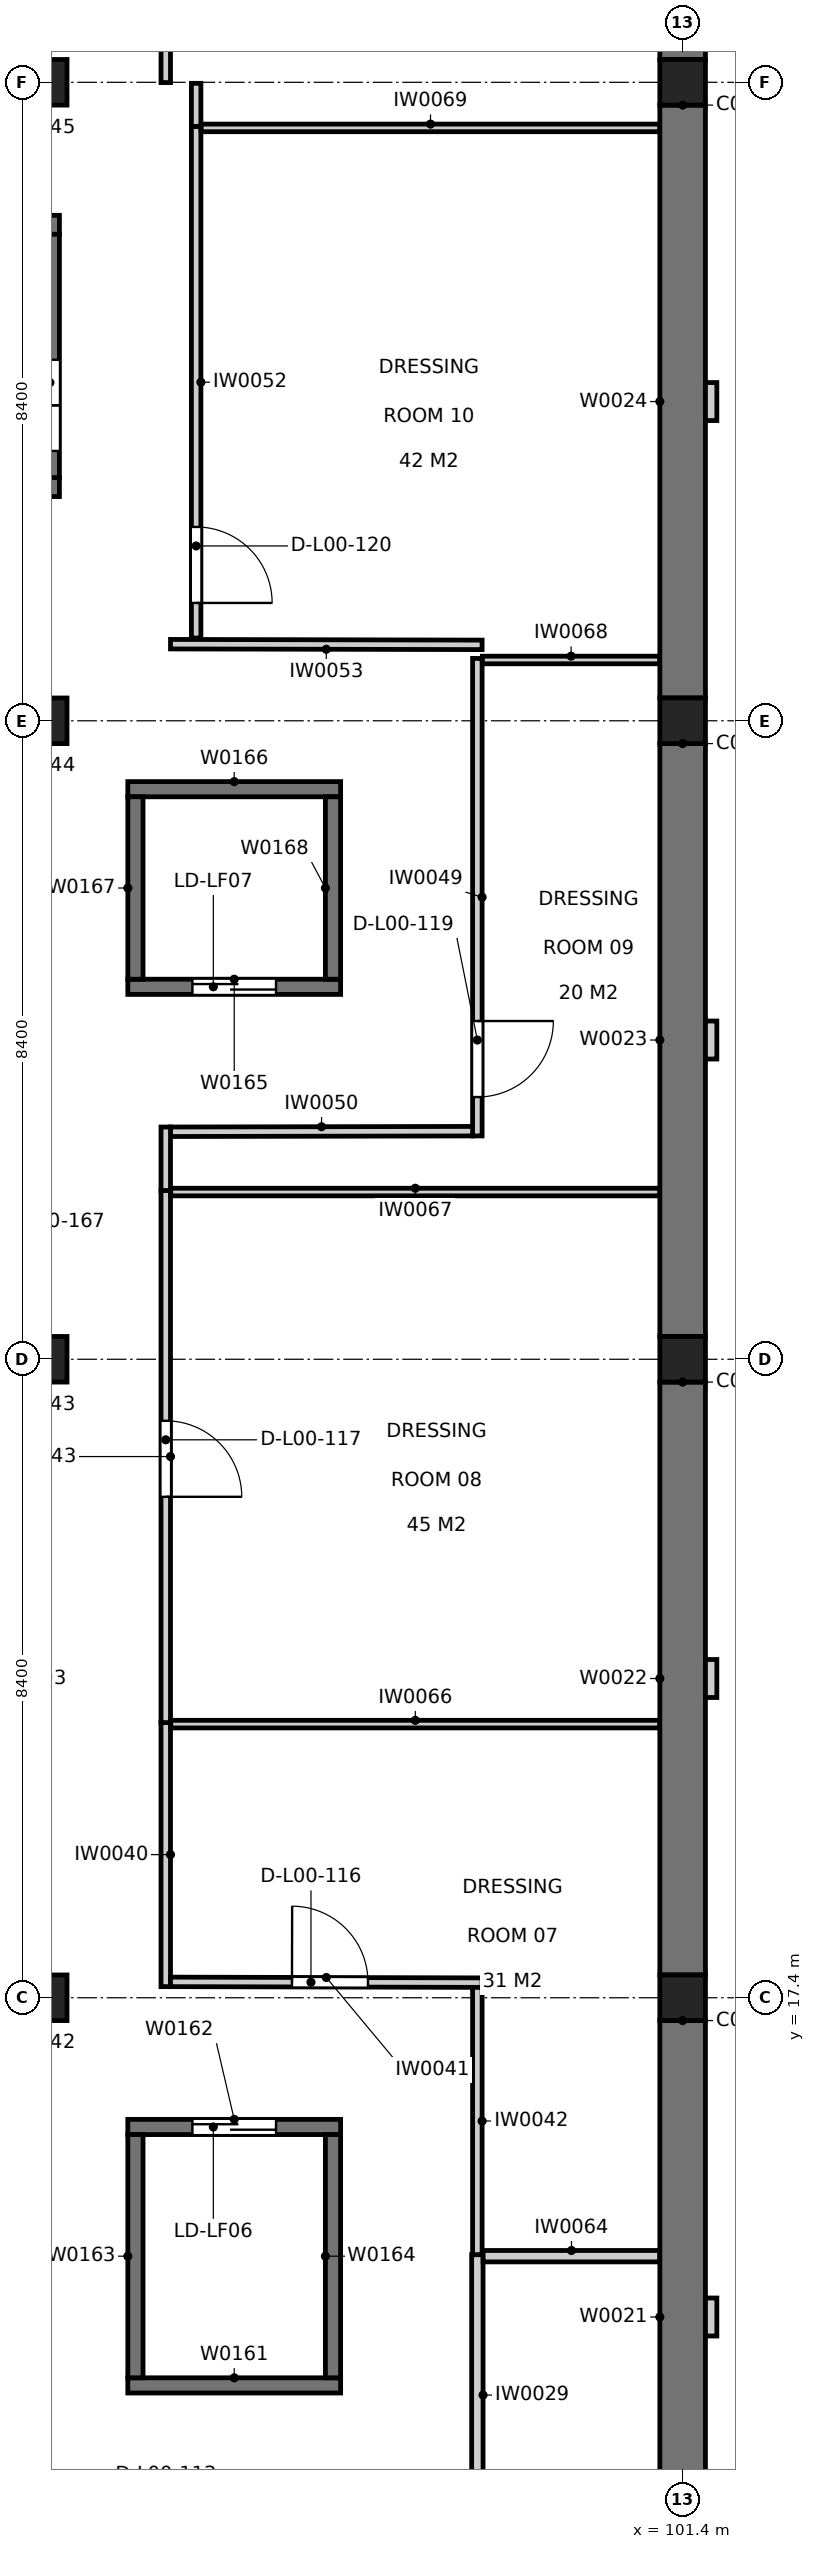
"""IFC4 building model, lengths in metres.
Left out: names, types, materials, properties, quantities, classifications, styles, units other than length and angle.
Written with IfcOpenShell. Run it as: python <this file> out.ifc"""

import sys

from ifc_helpers import new_model, si_unit, direction, frame, frame_2d, origin, origin_2d, place, context, subcontext, project, spatial, rectangle, extrude, element, fill, save


model = new_model("IFC4")
c1 = context("Model", 3, precision=1e-05, world=origin(), true_north=direction((0.0, 1.0)))
c2 = subcontext(c1, "Body", "Model", "MODEL_VIEW")
j1 = project(units=[si_unit("LENGTHUNIT", "METRE"), si_unit("PLANEANGLEUNIT", "RADIAN")], contexts=[c1])
p1 = place(None, origin())
s1 = spatial("IfcSite", under=j1, at=p1, CompositionType="ELEMENT")
p2 = place(p1, origin())
s2 = spatial("IfcBuilding", under=s1, at=p2, CompositionType="ELEMENT")
p3 = place(p2, origin())
s3 = spatial("IfcBuildingStorey", under=s2, at=p3, CompositionType="ELEMENT", Elevation=0.0)
for number, where, z_axis, x_axis in (
    (1, (93.0, 17.4, 0.0), (0.0, 0.0, 1.0), (1.0, 0.0, 0.0)),
    (2, (93.0, 25.8, 0.0), (0.0, 0.0, 1.0), (1.0, 0.0, 0.0)),
    (3, (93.0, 34.2, 0.0), (0.0, 0.0, 1.0), (1.0, 0.0, 0.0)),
    (4, (93.0, 42.6, 0.0), (0.0, 0.0, 1.0), (1.0, 0.0, 0.0)),
    (5, (101.4, 17.4, 0.0), (0.0, 0.0, 1.0), (1.0, 0.0, 0.0)),
    (6, (101.4, 25.8, 0.0), (0.0, 0.0, 1.0), (1.0, 0.0, 0.0)),
    (7, (101.4, 34.2, 0.0), (0.0, 0.0, 1.0), (1.0, 0.0, 0.0)),
    (8, (101.4, 42.6, 0.0), (0.0, 0.0, 1.0), (1.0, 0.0, 0.0)),
):
    element("IfcColumn", number, at=place(p3, frame(where, z_axis=z_axis, x_axis=x_axis)), inside=s3, PredefinedType="COLUMN", context=c2, shape_type="SweptSolid", body=[
        extrude(rectangle(XDim=0.6, YDim=0.6, at=origin_2d()), origin(), (0.0, 0.0, 1.0), 4.8),
    ])
for number, where, z_axis, x_axis in (
    (9, (101.4, 9.3, 0.0), (0.0, 0.0, 1.0), (0.0, 1.0, 0.0)),
    (10, (101.4, 17.7, 0.0), (0.0, 0.0, 1.0), (0.0, 1.0, 0.0)),
):
    element("IfcWall", number, at=place(p3, frame(where, z_axis=z_axis, x_axis=x_axis)), inside=s3, PredefinedType="SOLIDWALL", context=c2, shape_type="SweptSolid", body=[
        extrude(rectangle(XDim=7.8, YDim=0.6, at=frame_2d((3.9, 0.0))), origin(), (0.0, 0.0, 1.0), 4.8),
    ])
p4 = place(p3, frame((101.4, 26.1, 0.0), z_axis=(0.0, 0.0, 1.0), x_axis=(0.0, 1.0, 0.0)))
e11 = element("IfcWall", 11, at=p4, inside=s3, PredefinedType="SOLIDWALL", context=c2, shape_type="SweptSolid", body=[
    extrude(rectangle(XDim=7.8, YDim=0.6, at=frame_2d((3.9, 0.0))), origin(), (0.0, 0.0, 1.0), 4.8),
])
for number, where, z_axis, x_axis in (
    (12, (101.4, 34.5, 0.0), (0.0, 0.0, 1.0), (0.0, 1.0, 0.0)),
    (13, (101.4, 42.9, 0.0), (0.0, 0.0, 1.0), (0.0, 1.0, 0.0)),
):
    element("IfcWall", number, at=place(p3, frame(where, z_axis=z_axis, x_axis=x_axis)), inside=s3, PredefinedType="SOLIDWALL", context=c2, shape_type="SweptSolid", body=[
        extrude(rectangle(XDim=7.8, YDim=0.6, at=frame_2d((3.9, 0.0))), origin(), (0.0, 0.0, 1.0), 4.8),
    ])
for number, where, z_axis, x_axis in (
    (14, (85.8, 37.275, 0.0), (0.0, 0.0, 1.0), (1.0, 0.0, 0.0)),
    (15, (85.8, 40.725, 0.0), (0.0, 0.0, 1.0), (1.0, 0.0, 0.0)),
):
    element("IfcWall", number, at=place(p3, frame(where, z_axis=z_axis, x_axis=x_axis)), inside=s3, PredefinedType="SOLIDWALL", context=c2, shape_type="SweptSolid", body=[
        extrude(rectangle(XDim=7.4, YDim=0.25, at=frame_2d((3.7, 0.0))), origin(), (0.0, 0.0, 1.0), 4.8),
    ])
p5 = place(p3, frame((93.075, 37.4, 0.0), z_axis=(0.0, 0.0, 1.0), x_axis=(0.0, 1.0, 0.0)))
e16 = element("IfcWall", 16, at=p5, inside=s3, PredefinedType="SOLIDWALL", context=c2, shape_type="SweptSolid", body=[
    extrude(rectangle(XDim=3.2, YDim=0.25, at=frame_2d((1.6, 0.0))), origin(), (0.0, 0.0, 1.0), 4.8),
])
p6 = place(p5, frame((0.35, 0.0, 0.0)))
e17 = element("IfcOpeningElement", 17, at=p6, cuts=e16, PredefinedType="OPENING", context=c2, shape_type="SweptSolid", body=[
    extrude(rectangle(XDim=1.2, YDim=2.1, at=frame_2d((0.6, 1.05))), frame((0.0, 0.135, 0.0), z_axis=(0.0, -1.0, 0.0), x_axis=(1.0, 0.0, 0.0)), (0.0, 0.0, 1.0), 0.27),
])
p7 = place(p3, frame((94.1, 12.3, 0.0), z_axis=(0.0, 0.0, 1.0), x_axis=(1.0, 0.0, 0.0)))
e18 = element("IfcWall", 18, at=p7, inside=s3, PredefinedType="SOLIDWALL", context=c2, shape_type="SweptSolid", body=[
    extrude(rectangle(XDim=2.8, YDim=0.2, at=frame_2d((1.4, 0.0))), origin(), (0.0, 0.0, 1.0), 4.8),
])
p8 = place(p3, frame((94.1, 15.7, 0.0), z_axis=(0.0, 0.0, 1.0), x_axis=(1.0, 0.0, 0.0)))
e19 = element("IfcWall", 19, at=p8, inside=s3, PredefinedType="SOLIDWALL", context=c2, shape_type="SweptSolid", body=[
    extrude(rectangle(XDim=2.8, YDim=0.2, at=frame_2d((1.4, 0.0))), origin(), (0.0, 0.0, 1.0), 4.8),
])
p9 = place(p8, frame((0.85, 0.0, 0.0)))
e20 = element("IfcOpeningElement", 20, at=p9, cuts=e19, PredefinedType="OPENING", context=c2, shape_type="SweptSolid", body=[
    extrude(rectangle(XDim=1.1, YDim=2.1, at=frame_2d((0.55, 1.05))), frame((0.0, 0.11, 0.0), z_axis=(0.0, -1.0, 0.0), x_axis=(1.0, 0.0, 0.0)), (0.0, 0.0, 1.0), 0.22),
])
for number, where, z_axis, x_axis in (
    (21, (94.2, 12.4, 0.0), (0.0, 0.0, 1.0), (0.0, 1.0, 0.0)),
    (22, (96.8, 12.4, 0.0), (0.0, 0.0, 1.0), (0.0, 1.0, 0.0)),
):
    element("IfcWall", number, at=place(p3, frame(where, z_axis=z_axis, x_axis=x_axis)), inside=s3, PredefinedType="SOLIDWALL", context=c2, shape_type="SweptSolid", body=[
        extrude(rectangle(XDim=3.2, YDim=0.2, at=frame_2d((1.6, 0.0))), origin(), (0.0, 0.0, 1.0), 4.8),
    ])
p10 = place(p3, frame((94.1, 30.7, 0.0), z_axis=(0.0, 0.0, 1.0), x_axis=(1.0, 0.0, 0.0)))
e23 = element("IfcWall", 23, at=p10, inside=s3, PredefinedType="SOLIDWALL", context=c2, shape_type="SweptSolid", body=[
    extrude(rectangle(XDim=2.8, YDim=0.2, at=frame_2d((1.4, 0.0))), origin(), (0.0, 0.0, 1.0), 4.8),
])
p11 = place(p10, frame((0.85, 0.0, 0.0)))
e24 = element("IfcOpeningElement", 24, at=p11, cuts=e23, PredefinedType="OPENING", context=c2, shape_type="SweptSolid", body=[
    extrude(rectangle(XDim=1.1, YDim=2.1, at=frame_2d((0.55, 1.05))), frame((0.0, 0.11, 0.0), z_axis=(0.0, -1.0, 0.0), x_axis=(1.0, 0.0, 0.0)), (0.0, 0.0, 1.0), 0.22),
])
p12 = place(p3, frame((94.1, 33.3, 0.0), z_axis=(0.0, 0.0, 1.0), x_axis=(1.0, 0.0, 0.0)))
e25 = element("IfcWall", 25, at=p12, inside=s3, PredefinedType="SOLIDWALL", context=c2, shape_type="SweptSolid", body=[
    extrude(rectangle(XDim=2.8, YDim=0.2, at=frame_2d((1.4, 0.0))), origin(), (0.0, 0.0, 1.0), 4.8),
])
for number, where, z_axis, x_axis in (
    (26, (94.2, 30.8, 0.0), (0.0, 0.0, 1.0), (0.0, 1.0, 0.0)),
    (27, (96.8, 30.8, 0.0), (0.0, 0.0, 1.0), (0.0, 1.0, 0.0)),
):
    element("IfcWall", number, at=place(p3, frame(where, z_axis=z_axis, x_axis=x_axis)), inside=s3, PredefinedType="SOLIDWALL", context=c2, shape_type="SweptSolid", body=[
        extrude(rectangle(XDim=2.4, YDim=0.2, at=frame_2d((1.2, 0.0))), origin(), (0.0, 0.0, 1.0), 4.8),
    ])
p13 = place(p3, frame((98.699, 14.02, 0.0), z_axis=(0.0, 0.0, 1.0), x_axis=(0.0, -1.0, 0.0)))
e28 = element("IfcWall", 28, at=p13, inside=s3, PredefinedType="PARTITIONING", context=c2, shape_type="SweptSolid", body=[
    extrude(rectangle(XDim=3.694, YDim=0.15, at=frame_2d((1.847, 0.0))), origin(), (0.0, 0.0, 1.0), 3.94),
])
p14 = place(p3, frame((94.599, 21.02, 0.0), z_axis=(0.0, 0.0, 1.0), x_axis=(0.0, -1.0, 0.0)))
e29 = element("IfcWall", 29, at=p14, inside=s3, PredefinedType="PARTITIONING", context=c2, shape_type="SweptSolid", body=[
    extrude(rectangle(XDim=3.474, YDim=0.125, at=frame_2d((1.737, 0.0))), origin(), (0.0, 0.0, 1.0), 3.84),
])
p15 = place(p3, frame((94.662, 17.609, 0.0), z_axis=(0.0, 0.0, 1.0), x_axis=(0.999997019568, -0.002441486203, 0.0)))
e30 = element("IfcWall", 30, at=p15, inside=s3, PredefinedType="PARTITIONING", context=c2, shape_type="SweptSolid", body=[
    extrude(rectangle(XDim=4.1, YDim=0.125, at=frame_2d((2.05, 0.0))), origin(), (0.0, 0.0, 1.0), 3.84),
])
p16 = place(p15, frame((1.598, 0.0, 0.0)))
e31 = element("IfcOpeningElement", 31, at=p16, cuts=e30, PredefinedType="OPENING", context=c2, shape_type="SweptSolid", body=[
    extrude(rectangle(XDim=1.0, YDim=2.1, at=frame_2d((0.5, 1.05))), frame((0.0, 0.073, 0.0), z_axis=(0.0, -1.0, 0.0), x_axis=(1.0, 0.0, 0.0)), (0.0, 0.0, 1.0), 0.145),
])
p17 = place(p3, frame((98.699, 17.537, 0.0), z_axis=(0.0, 0.0, 1.0), x_axis=(0.0, -1.0, 0.0)))
e32 = element("IfcWall", 32, at=p17, inside=s3, PredefinedType="PARTITIONING", context=c2, shape_type="SweptSolid", body=[
    extrude(rectangle(XDim=3.517, YDim=0.125, at=frame_2d((1.758, 0.0))), origin(), (0.0, 0.0, 1.0), 3.84),
])
p18 = place(p3, frame((94.599, 28.02, 0.0), z_axis=(0.0, 0.0, 1.0), x_axis=(0.0, -1.0, 0.0)))
e33 = element("IfcWall", 33, at=p18, inside=s3, PredefinedType="PARTITIONING", context=c2, shape_type="SweptSolid", body=[
    extrude(rectangle(XDim=7.0, YDim=0.125, at=frame_2d((3.5, 0.0))), origin(), (0.0, 0.0, 1.0), 3.84),
])
p19 = place(p18, frame((3.03, 0.0, 0.0)))
e34 = element("IfcOpeningElement", 34, at=p19, cuts=e33, PredefinedType="OPENING", context=c2, shape_type="SweptSolid", body=[
    extrude(rectangle(XDim=1.0, YDim=2.1, at=frame_2d((0.5, 1.05))), frame((0.0, 0.073, 0.0), z_axis=(0.0, -1.0, 0.0), x_axis=(1.0, 0.0, 0.0)), (0.0, 0.0, 1.0), 0.145),
])
p20 = place(p3, frame((98.699, 35.02, 0.0), z_axis=(0.0, 0.0, 1.0), x_axis=(0.0, -1.0, 0.0)))
e35 = element("IfcWall", 35, at=p20, inside=s3, PredefinedType="PARTITIONING", context=c2, shape_type="SweptSolid", body=[
    extrude(rectangle(XDim=6.281, YDim=0.125, at=frame_2d((3.141, 0.0))), origin(), (0.0, 0.0, 1.0), 3.84),
])
p21 = place(p20, frame((4.77, 0.0, 0.0)))
e36 = element("IfcOpeningElement", 36, at=p21, cuts=e35, PredefinedType="OPENING", context=c2, shape_type="SweptSolid", body=[
    extrude(rectangle(XDim=1.0, YDim=2.1, at=frame_2d((0.5, 1.05))), frame((0.0, 0.073, 0.0), z_axis=(0.0, -1.0, 0.0), x_axis=(1.0, 0.0, 0.0)), (0.0, 0.0, 1.0), 0.145),
])
p22 = place(p3, frame((98.636, 28.801, 0.0), z_axis=(0.0, 0.0, 1.0), x_axis=(-0.999998187283, -0.001904056496, 0.0)))
e37 = element("IfcWall", 37, at=p22, inside=s3, PredefinedType="PARTITIONING", context=c2, shape_type="SweptSolid", body=[
    extrude(rectangle(XDim=3.975, YDim=0.125, at=frame_2d((1.987, 0.0))), origin(), (0.0, 0.0, 1.0), 3.94),
])
p23 = place(p3, frame((94.599, 28.855, 0.0), z_axis=(0.0, 0.0, 1.0), x_axis=(0.0, -1.0, 0.0)))
e38 = element("IfcWall", 38, at=p23, inside=s3, PredefinedType="PARTITIONING", context=c2, shape_type="SweptSolid", body=[
    extrude(rectangle(XDim=0.835, YDim=0.125, at=frame_2d((0.418, 0.0))), origin(), (0.0, 0.0, 1.0), 3.94),
])
p24 = place(p3, frame((94.999, 42.02, 0.0), z_axis=(0.0, 0.0, 1.0), x_axis=(0.0, -1.0, 0.0)))
e39 = element("IfcWall", 39, at=p24, inside=s3, PredefinedType="PARTITIONING", context=c2, shape_type="SweptSolid", body=[
    extrude(rectangle(XDim=6.731, YDim=0.125, at=frame_2d((3.366, 0.0))), origin(), (0.0, 0.0, 1.0), 3.94),
])
p25 = place(p24, frame((5.27, 0.0, 0.0)))
e40 = element("IfcOpeningElement", 40, at=p25, cuts=e39, PredefinedType="OPENING", context=c2, shape_type="SweptSolid", body=[
    extrude(rectangle(XDim=1.0, YDim=2.1, at=frame_2d((0.5, 1.05))), frame((0.0, 0.073, 0.0), z_axis=(0.0, -1.0, 0.0), x_axis=(1.0, 0.0, 0.0)), (0.0, 0.0, 1.0), 0.145),
])
p26 = place(p3, frame((94.662, 35.208, 0.0), z_axis=(0.0, 0.0, 1.0), x_axis=(0.999997702175, -0.002143745446, 0.0)))
e41 = element("IfcWall", 41, at=p26, inside=s3, PredefinedType="PARTITIONING", context=c2, shape_type="SweptSolid", body=[
    extrude(rectangle(XDim=4.1, YDim=0.125, at=frame_2d((2.05, 0.0))), origin(), (0.0, 0.0, 1.0), 4.64),
])
p27 = place(p3, frame((94.599, 49.02, 0.0), z_axis=(0.0, 0.0, 1.0), x_axis=(0.0, -1.0, 0.0)))
e42 = element("IfcWall", 42, at=p27, inside=s3, PredefinedType="PARTITIONING", context=c2, shape_type="SweptSolid", body=[
    extrude(rectangle(XDim=6.424, YDim=0.125, at=frame_2d((3.212, 0.0))), origin(), (0.0, 0.0, 1.0), 3.84),
])
p28 = place(p27, frame((3.229, 0.0, 0.0)))
e43 = element("IfcOpeningElement", 43, at=p28, cuts=e42, PredefinedType="OPENING", context=c2, shape_type="SweptSolid", body=[
    extrude(rectangle(XDim=1.0, YDim=2.1, at=frame_2d((0.5, 1.05))), frame((0.0, 0.073, 0.0), z_axis=(0.0, -1.0, 0.0), x_axis=(1.0, 0.0, 0.0)), (0.0, 0.0, 1.0), 0.145),
])
p29 = place(p3, frame((94.999, 42.586, 0.0), z_axis=(0.0, 0.0, 1.0), x_axis=(0.0, -1.0, 0.0)))
e44 = element("IfcWall", 44, at=p29, inside=s3, PredefinedType="PARTITIONING", context=c2, shape_type="SweptSolid", body=[
    extrude(rectangle(XDim=0.566, YDim=0.125, at=frame_2d((0.283, 0.0))), origin(), (0.0, 0.0, 1.0), 3.84),
])
p30 = place(p3, frame((98.775, 14.0, 0.0), z_axis=(0.0, 0.0, 1.0), x_axis=(1.0, 0.0, 0.0)))
e45 = element("IfcWall", 45, at=p30, inside=s3, PredefinedType="PARTITIONING", context=c2, shape_type="SweptSolid", body=[
    extrude(rectangle(XDim=2.325, YDim=0.15, at=frame_2d((1.163, 0.0))), origin(), (0.0, 0.0, 1.0), 4.64),
])
for number, where, z_axis, x_axis in (
    (46, (94.665, 21.0, 0.0), (0.0, 0.0, 1.0), (1.0, 0.0, 0.0)),
    (47, (94.665, 28.0, 0.0), (0.0, 0.0, 1.0), (1.0, 0.0, 0.0)),
):
    element("IfcWall", number, at=place(p3, frame(where, z_axis=z_axis, x_axis=x_axis)), inside=s3, PredefinedType="PARTITIONING", context=c2, shape_type="SweptSolid", body=[
        extrude(rectangle(XDim=6.435, YDim=0.1, at=frame_2d((3.218, 0.0))), origin(), (0.0, 0.0, 1.0), 4.64),
    ])
p31 = place(p3, frame((98.765, 35.0, 0.0), z_axis=(0.0, 0.0, 1.0), x_axis=(1.0, 0.0, 0.0)))
e48 = element("IfcWall", 48, at=p31, inside=s3, PredefinedType="PARTITIONING", context=c2, shape_type="SweptSolid", body=[
    extrude(rectangle(XDim=2.335, YDim=0.1, at=frame_2d((1.167, 0.0))), origin(), (0.0, 0.0, 1.0), 4.64),
])
p32 = place(p3, frame((95.065, 42.0, 0.0), z_axis=(0.0, 0.0, 1.0), x_axis=(1.0, 0.0, 0.0)))
e49 = element("IfcWall", 49, at=p32, inside=s3, PredefinedType="PARTITIONING", context=c2, shape_type="SweptSolid", body=[
    extrude(rectangle(XDim=6.035, YDim=0.1, at=frame_2d((3.018, 0.0))), origin(), (0.0, 0.0, 1.0), 4.64),
])
for number, where, z_axis, x_axis in (
    (50, (101.775, 12.95, 0.0), (0.0, 0.0, 1.0), (0.0, 1.0, 0.0)),
    (51, (101.775, 21.35, 0.0), (0.0, 0.0, 1.0), (0.0, 1.0, 0.0)),
    (52, (101.775, 29.75, 0.0), (0.0, 0.0, 1.0), (0.0, 1.0, 0.0)),
    (53, (101.775, 38.15, 0.0), (0.0, 0.0, 1.0), (0.0, 1.0, 0.0)),
):
    element("IfcWall", number, at=place(p3, frame(where, z_axis=z_axis, x_axis=x_axis)), inside=s3, PredefinedType="SOLIDWALL", context=c2, shape_type="SweptSolid", body=[
        extrude(rectangle(XDim=0.5, YDim=0.15, at=frame_2d((0.25, 0.0))), origin(), (0.0, 0.0, 1.0), 4.8),
    ])
p33 = place(p16, origin())
e54 = element("IfcDoor", 54, at=p33, inside=s3, OperationType="SINGLE_SWING_LEFT", PredefinedType="DOOR", context=c2, shape_type="SweptSolid", body=[
    extrude(rectangle(XDim=1.0, YDim=2.1, at=frame_2d((0.5, 1.05))), frame((0.0, 0.025, 0.0), z_axis=(0.0, -1.0, 0.0), x_axis=(1.0, 0.0, 0.0)), (0.0, 0.0, 1.0), 0.05),
])
fill(e31, e54)
p34 = place(p19, origin())
e55 = element("IfcDoor", 55, at=p34, inside=s3, OperationType="SINGLE_SWING_RIGHT", PredefinedType="DOOR", context=c2, shape_type="SweptSolid", body=[
    extrude(rectangle(XDim=1.0, YDim=2.1, at=frame_2d((0.5, 1.05))), frame((0.0, 0.025, 0.0), z_axis=(0.0, -1.0, 0.0), x_axis=(1.0, 0.0, 0.0)), (0.0, 0.0, 1.0), 0.05),
])
fill(e34, e55)
p35 = place(p21, origin())
e56 = element("IfcDoor", 56, at=p35, inside=s3, OperationType="SINGLE_SWING_LEFT", PredefinedType="DOOR", context=c2, shape_type="SweptSolid", body=[
    extrude(rectangle(XDim=1.0, YDim=2.1, at=frame_2d((0.5, 1.05))), frame((0.0, 0.025, 0.0), z_axis=(0.0, -1.0, 0.0), x_axis=(1.0, 0.0, 0.0)), (0.0, 0.0, 1.0), 0.05),
])
fill(e36, e56)
p36 = place(p25, origin())
e57 = element("IfcDoor", 57, at=p36, inside=s3, OperationType="SINGLE_SWING_RIGHT", PredefinedType="DOOR", context=c2, shape_type="SweptSolid", body=[
    extrude(rectangle(XDim=1.0, YDim=2.1, at=frame_2d((0.5, 1.05))), frame((0.0, 0.025, 0.0), z_axis=(0.0, -1.0, 0.0), x_axis=(1.0, 0.0, 0.0)), (0.0, 0.0, 1.0), 0.05),
])
fill(e40, e57)
p37 = place(p9, origin())
e58 = element("IfcDoor", 58, at=p37, inside=s3, OperationType="SLIDING_TO_LEFT", PredefinedType="DOOR", context=c2, shape_type="SweptSolid", body=[
    extrude(rectangle(XDim=1.1, YDim=2.1, at=frame_2d((0.55, 1.05))), frame((0.0, 0.025, 0.0), z_axis=(0.0, -1.0, 0.0), x_axis=(1.0, 0.0, 0.0)), (0.0, 0.0, 1.0), 0.05),
])
fill(e20, e58)
p38 = place(p11, origin())
e59 = element("IfcDoor", 59, at=p38, inside=s3, OperationType="SLIDING_TO_LEFT", PredefinedType="DOOR", context=c2, shape_type="SweptSolid", body=[
    extrude(rectangle(XDim=1.1, YDim=2.1, at=frame_2d((0.55, 1.05))), frame((0.0, 0.025, 0.0), z_axis=(0.0, -1.0, 0.0), x_axis=(1.0, 0.0, 0.0)), (0.0, 0.0, 1.0), 0.05),
])
fill(e24, e59)
save(model, sys.argv[1])
